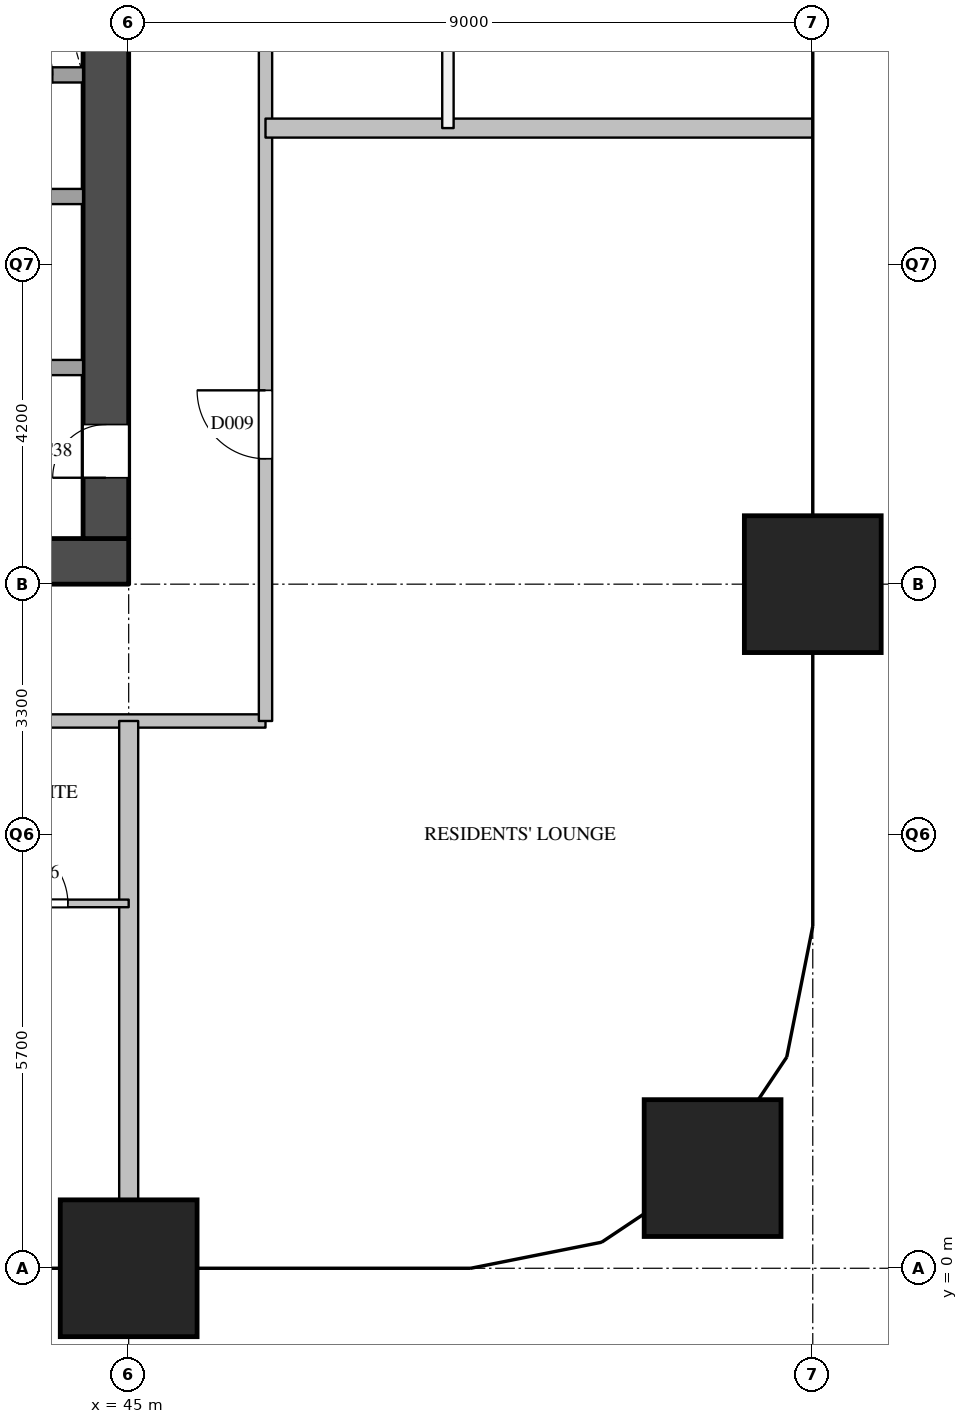
"""IFC4 building model, lengths in metres.
Left out: names, types, materials, properties, quantities, classifications, styles, units other than length and angle.
Written with IfcOpenShell. Run it as: python <this file> out.ifc"""

import sys

from ifc_helpers import new_model, si_unit, direction, frame, frame_2d, origin, origin_2d, place, context, subcontext, project, spatial, rectangle, extrude, element, fill, save


model = new_model("IFC4")
c1 = context("Model", 3, precision=1e-05, world=origin(), true_north=direction((0.0, 1.0)))
c2 = subcontext(c1, "Body", "Model", "MODEL_VIEW")
j1 = project(units=[si_unit("LENGTHUNIT", "METRE"), si_unit("PLANEANGLEUNIT", "RADIAN")], contexts=[c1])
p1 = place(None, origin())
s1 = spatial("IfcSite", under=j1, at=p1, CompositionType="ELEMENT")
p2 = place(p1, origin())
s2 = spatial("IfcBuilding", under=s1, at=p2, CompositionType="ELEMENT")
p3 = place(p2, frame((0.0, 0.0, 42.4)))
s3 = spatial("IfcBuildingStorey", under=s2, at=p3, CompositionType="ELEMENT", Elevation=42.4)
for number, where, z_axis, x_axis in (
    (1, (45.0, 0.0, 0.0), (0.0, 0.0, 1.0), (1.0, 0.0, 0.0)),
    (2, (52.682, 1.318, 0.0), (0.0, 0.0, 1.0), (1.0, 0.0, 0.0)),
    (3, (54.0, 9.0, 0.0), (0.0, 0.0, 1.0), (1.0, 0.0, 0.0)),
):
    element("IfcColumn", number, at=place(p3, frame(where, z_axis=z_axis, x_axis=x_axis)), inside=s3, PredefinedType="COLUMN", context=c2, shape_type="SweptSolid", body=[
        extrude(rectangle(XDim=1.8, YDim=1.8, at=origin_2d()), origin(), (0.0, 0.0, 1.0), 3.8),
    ])
p4 = place(p3, frame((36.0, 9.3, 0.0), z_axis=(0.0, 0.0, 1.0), x_axis=(1.0, 0.0, 0.0)))
e4 = element("IfcWall", 4, at=p4, inside=s3, PredefinedType="SHEAR", context=c2, shape_type="SweptSolid", body=[
    extrude(rectangle(XDim=9.0, YDim=0.6, at=frame_2d((4.5, 0.0))), origin(), (0.0, 0.0, 1.0), 3.5),
])
p5 = place(p3, frame((44.7, 9.6, 0.0), z_axis=(0.0, 0.0, 1.0), x_axis=(0.0, 1.0, 0.0)))
e5 = element("IfcWall", 5, at=p5, inside=s3, PredefinedType="SHEAR", context=c2, shape_type="SweptSolid", body=[
    extrude(rectangle(XDim=12.3, YDim=0.6, at=frame_2d((6.15, 0.0))), origin(), (0.0, 0.0, 1.0), 3.5),
])
p6 = place(p5, frame((0.8, 0.0, 0.0)))
e6 = element("IfcOpeningElement", 6, at=p6, cuts=e5, PredefinedType="OPENING", context=c2, shape_type="SweptSolid", body=[
    extrude(rectangle(XDim=0.7, YDim=2.1, at=frame_2d((0.35, 1.05))), frame((0.0, 0.31, 0.0), z_axis=(0.0, -1.0, 0.0), x_axis=(1.0, 0.0, 0.0)), (0.0, 0.0, 1.0), 0.62),
])
p7 = place(p3, frame((36.6, 11.85, 0.0), z_axis=(0.0, 0.0, 1.0), x_axis=(1.0, 0.0, 0.0)))
e7 = element("IfcWall", 7, at=p7, inside=s3, PredefinedType="SOLIDWALL", context=c2, shape_type="SweptSolid", body=[
    extrude(rectangle(XDim=7.8, YDim=0.2, at=frame_2d((3.9, 0.0))), origin(), (0.0, 0.0, 1.0), 3.5),
])
p8 = place(p3, frame((42.6, 14.1, 0.0), z_axis=(0.0, 0.0, 1.0), x_axis=(1.0, 0.0, 0.0)))
e8 = element("IfcWall", 8, at=p8, inside=s3, PredefinedType="SOLIDWALL", context=c2, shape_type="SweptSolid", body=[
    extrude(rectangle(XDim=1.8, YDim=0.2, at=frame_2d((0.9, 0.0))), origin(), (0.0, 0.0, 1.0), 3.5),
])
p9 = place(p8, frame((0.55, 0.0, 0.0)))
e9 = element("IfcOpeningElement", 9, at=p9, cuts=e8, PredefinedType="OPENING", context=c2, shape_type="SweptSolid", body=[
    extrude(rectangle(XDim=0.7, YDim=2.1, at=frame_2d((0.35, 1.05))), frame((0.0, 0.11, 0.0), z_axis=(0.0, -1.0, 0.0), x_axis=(1.0, 0.0, 0.0)), (0.0, 0.0, 1.0), 0.22),
])
p10 = place(p3, frame((42.9, 15.7, 0.0), z_axis=(0.0, 0.0, 1.0), x_axis=(1.0, 0.0, 0.0)))
e10 = element("IfcWall", 10, at=p10, inside=s3, PredefinedType="SOLIDWALL", context=c2, shape_type="SweptSolid", body=[
    extrude(rectangle(XDim=1.5, YDim=0.2, at=frame_2d((0.75, 0.0))), origin(), (0.0, 0.0, 1.0), 3.5),
])
p11 = place(p10, frame((0.4, 0.0, 0.0)))
e11 = element("IfcOpeningElement", 11, at=p11, cuts=e10, PredefinedType="OPENING", context=c2, shape_type="SweptSolid", body=[
    extrude(rectangle(XDim=0.7, YDim=2.1, at=frame_2d((0.35, 1.05))), frame((0.0, 0.11, 0.0), z_axis=(0.0, -1.0, 0.0), x_axis=(1.0, 0.0, 0.0)), (0.0, 0.0, 1.0), 0.22),
])
p12 = place(p3, frame((34.2, 7.2, 0.0), z_axis=(0.0, 0.0, 1.0), x_axis=(1.0, 0.0, 0.0)))
e12 = element("IfcWall", 12, at=p12, inside=s3, PredefinedType="PARTITIONING", context=c2, shape_type="SweptSolid", body=[
    extrude(rectangle(XDim=12.6, YDim=0.175, at=frame_2d((6.3, 0.0))), origin(), (0.0, 0.0, 1.0), 3.5),
])
p13 = place(p12, frame((6.6, 0.0, 0.0)))
e13 = element("IfcOpeningElement", 13, at=p13, cuts=e12, PredefinedType="OPENING", context=c2, shape_type="SweptSolid", body=[
    extrude(rectangle(XDim=1.0, YDim=2.1, at=frame_2d((0.5, 1.05))), frame((0.0, 0.097, 0.0), z_axis=(0.0, -1.0, 0.0), x_axis=(1.0, 0.0, 0.0)), (0.0, 0.0, 1.0), 0.195),
])
p14 = place(p12, frame((2.45, 0.0, 0.0)))
e14 = element("IfcOpeningElement", 14, at=p14, cuts=e12, PredefinedType="OPENING", context=c2, shape_type="SweptSolid", body=[
    extrude(rectangle(XDim=0.9, YDim=2.1, at=frame_2d((0.45, 1.05))), frame((0.0, 0.097, 0.0), z_axis=(0.0, -1.0, 0.0), x_axis=(1.0, 0.0, 0.0)), (0.0, 0.0, 1.0), 0.195),
])
p15 = place(p3, frame((46.8, 7.2, 0.0), z_axis=(0.0, 0.0, 1.0), x_axis=(0.0, 1.0, 0.0)))
e15 = element("IfcWall", 15, at=p15, inside=s3, PredefinedType="PARTITIONING", context=c2, shape_type="SweptSolid", body=[
    extrude(rectangle(XDim=16.49, YDim=0.175, at=frame_2d((8.245, 0.0))), origin(), (0.0, 0.0, 1.0), 3.5),
])
p16 = place(p15, frame((3.45, 0.0, 0.0)))
e16 = element("IfcOpeningElement", 16, at=p16, cuts=e15, PredefinedType="OPENING", context=c2, shape_type="SweptSolid", body=[
    extrude(rectangle(XDim=0.9, YDim=2.1, at=frame_2d((0.45, 1.05))), frame((0.0, 0.097, 0.0), z_axis=(0.0, -1.0, 0.0), x_axis=(1.0, 0.0, 0.0)), (0.0, 0.0, 1.0), 0.195),
])
p17 = place(p15, frame((11.1, 0.0, 0.0)))
e17 = element("IfcOpeningElement", 17, at=p17, cuts=e15, PredefinedType="OPENING", context=c2, shape_type="SweptSolid", body=[
    extrude(rectangle(XDim=1.0, YDim=2.1, at=frame_2d((0.5, 1.05))), frame((0.0, 0.097, 0.0), z_axis=(0.0, -1.0, 0.0), x_axis=(1.0, 0.0, 0.0)), (0.0, 0.0, 1.0), 0.195),
])
p18 = place(p3, frame((49.2, 15.0, 0.0), z_axis=(0.0, 0.0, 1.0), x_axis=(0.0, 1.0, 0.0)))
e18 = element("IfcWall", 18, at=p18, inside=s3, PredefinedType="PARTITIONING", context=c2, shape_type="SweptSolid", body=[
    extrude(rectangle(XDim=7.6, YDim=0.15, at=frame_2d((3.8, 0.0))), origin(), (0.0, 0.0, 1.0), 3.5),
])
p19 = place(p18, frame((3.35, 0.0, 0.0)))
e19 = element("IfcOpeningElement", 19, at=p19, cuts=e18, PredefinedType="OPENING", context=c2, shape_type="SweptSolid", body=[
    extrude(rectangle(XDim=0.9, YDim=2.1, at=frame_2d((0.45, 1.05))), frame((0.0, 0.085, 0.0), z_axis=(0.0, -1.0, 0.0), x_axis=(1.0, 0.0, 0.0)), (0.0, 0.0, 1.0), 0.17),
])
p20 = place(p3, frame((46.8, 15.0, 0.0), z_axis=(0.0, 0.0, 1.0), x_axis=(1.0, 0.0, 0.0)))
e20 = element("IfcWall", 20, at=p20, inside=s3, PredefinedType="PARTITIONING", context=c2, shape_type="SweptSolid", body=[
    extrude(rectangle(XDim=7.2, YDim=0.25, at=frame_2d((3.6, 0.0))), origin(), (0.0, 0.0, 1.0), 2.5),
])
p21 = place(p3, frame((45.0, 0.0, 0.0), z_axis=(0.0, 0.0, 1.0), x_axis=(0.0, 1.0, 0.0)))
e21 = element("IfcWall", 21, at=p21, inside=s3, PredefinedType="PARTITIONING", context=c2, shape_type="SweptSolid", body=[
    extrude(rectangle(XDim=7.2, YDim=0.25, at=frame_2d((3.6, 0.0))), origin(), (0.0, 0.0, 1.0), 3.5),
])
p22 = place(p3, frame((42.6, 4.8, 0.0), z_axis=(0.0, 0.0, 1.0), x_axis=(1.0, 0.0, 0.0)))
e22 = element("IfcWall", 22, at=p22, inside=s3, PredefinedType="PARTITIONING", context=c2, shape_type="SweptSolid", body=[
    extrude(rectangle(XDim=2.4, YDim=0.1, at=frame_2d((1.2, 0.0))), origin(), (0.0, 0.0, 1.0), 3.5),
])
p23 = place(p22, frame((0.8, 0.0, 0.0)))
e23 = element("IfcOpeningElement", 23, at=p23, cuts=e22, PredefinedType="OPENING", context=c2, shape_type="SweptSolid", body=[
    extrude(rectangle(XDim=0.8, YDim=2.1, at=frame_2d((0.4, 1.05))), frame((0.0, 0.06, 0.0), z_axis=(0.0, -1.0, 0.0), x_axis=(1.0, 0.0, 0.0)), (0.0, 0.0, 1.0), 0.12),
])
p24 = place(p6, origin())
e24 = element("IfcDoor", 24, at=p24, inside=s3, OperationType="SINGLE_SWING_LEFT", PredefinedType="DOOR", context=c2, shape_type="SweptSolid", body=[
    extrude(rectangle(XDim=0.7, YDim=2.1, at=frame_2d((0.35, 1.05))), frame((0.0, 0.025, 0.0), z_axis=(0.0, -1.0, 0.0), x_axis=(1.0, 0.0, 0.0)), (0.0, 0.0, 1.0), 0.05),
])
fill(e6, e24)
p25 = place(p23, origin())
e25 = element("IfcDoor", 25, at=p25, inside=s3, OperationType="SINGLE_SWING_LEFT", PredefinedType="DOOR", context=c2, shape_type="SweptSolid", body=[
    extrude(rectangle(XDim=0.8, YDim=2.1, at=frame_2d((0.4, 1.05))), frame((0.0, 0.025, 0.0), z_axis=(0.0, -1.0, 0.0), x_axis=(1.0, 0.0, 0.0)), (0.0, 0.0, 1.0), 0.05),
])
fill(e23, e25)
p26 = place(p16, origin())
e26 = element("IfcDoor", 26, at=p26, inside=s3, OperationType="SINGLE_SWING_RIGHT", PredefinedType="DOOR", context=c2, shape_type="SweptSolid", body=[
    extrude(rectangle(XDim=0.9, YDim=2.1, at=frame_2d((0.45, 1.05))), frame((0.0, 0.025, 0.0), z_axis=(0.0, -1.0, 0.0), x_axis=(1.0, 0.0, 0.0)), (0.0, 0.0, 1.0), 0.05),
])
fill(e16, e26)
save(model, sys.argv[1])
